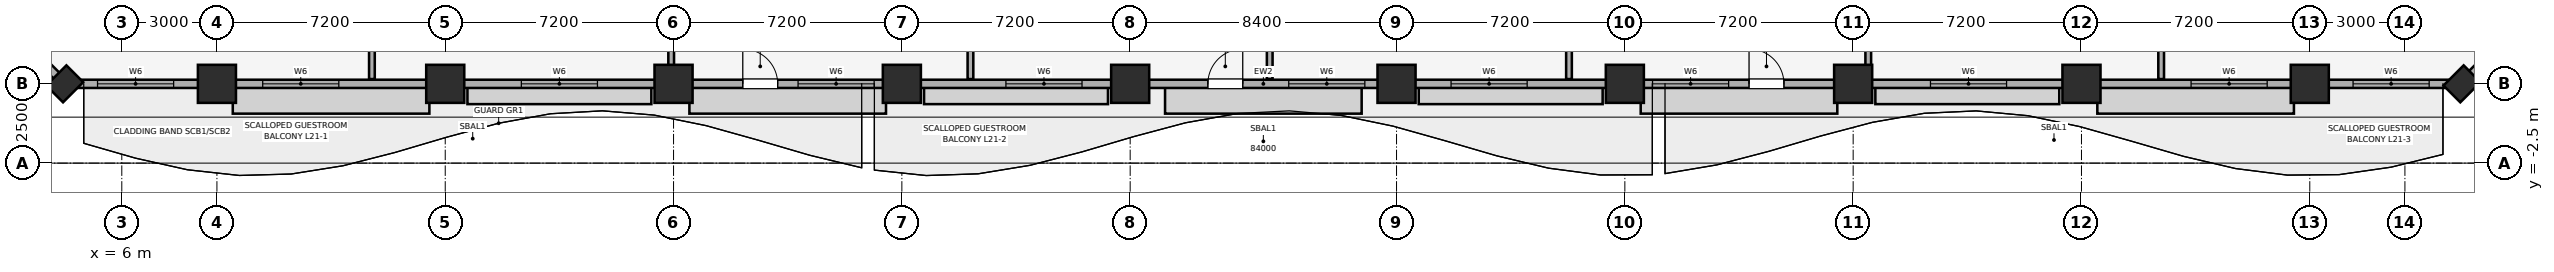
"""IFC4 building model, lengths in metres.
Left out: names, types, materials, properties, quantities, classifications, styles, units other than length and angle.
Written with IfcOpenShell. Run it as: python <this file> out.ifc"""

import sys

from ifc_helpers import new_model, si_unit, direction, frame, frame_2d, origin, origin_2d, place, context, subcontext, project, spatial, rectangle, extrude, element, fill, save


model = new_model("IFC4")
c1 = context("Model", 3, precision=1e-05, world=origin(), true_north=direction((0.0, 1.0)))
c2 = subcontext(c1, "Body", "Model", "MODEL_VIEW")
j1 = project(units=[si_unit("LENGTHUNIT", "METRE"), si_unit("PLANEANGLEUNIT", "RADIAN")], contexts=[c1])
p1 = place(None, origin())
s1 = spatial("IfcSite", under=j1, at=p1, CompositionType="ELEMENT")
p2 = place(p1, origin())
s2 = spatial("IfcBuilding", under=s1, at=p2, CompositionType="ELEMENT")
p3 = place(p2, frame((0.0, 0.0, 93.05)))
s3 = spatial("IfcBuildingStorey", under=s2, at=p3, CompositionType="ELEMENT", Elevation=93.05)
for number, where, z_axis, x_axis in (
    (1, (9.0, 0.0, 0.0), (0.0, 0.0, 1.0), (1.0, 0.0, 0.0)),
    (2, (16.2, 0.0, 0.0), (0.0, 0.0, 1.0), (1.0, 0.0, 0.0)),
    (3, (23.4, 0.0, 0.0), (0.0, 0.0, 1.0), (1.0, 0.0, 0.0)),
    (4, (30.6, 0.0, 0.0), (0.0, 0.0, 1.0), (1.0, 0.0, 0.0)),
    (5, (37.8, 0.0, 0.0), (0.0, 0.0, 1.0), (1.0, 0.0, 0.0)),
    (6, (46.2, 0.0, 0.0), (0.0, 0.0, 1.0), (1.0, 0.0, 0.0)),
    (7, (53.4, 0.0, 0.0), (0.0, 0.0, 1.0), (1.0, 0.0, 0.0)),
    (8, (60.6, 0.0, 0.0), (0.0, 0.0, 1.0), (1.0, 0.0, 0.0)),
    (9, (67.8, 0.0, 0.0), (0.0, 0.0, 1.0), (1.0, 0.0, 0.0)),
    (10, (75.0, 0.0, 0.0), (0.0, 0.0, 1.0), (1.0, 0.0, 0.0)),
):
    element("IfcColumn", number, at=place(p3, frame(where, z_axis=z_axis, x_axis=x_axis)), inside=s3, PredefinedType="COLUMN", context=c2, shape_type="SweptSolid", body=[
        extrude(rectangle(XDim=1.2, YDim=1.2, at=origin_2d()), origin(), (0.0, 0.0, 1.0), 3.51),
    ])
for number, where, z_axis, x_axis in (
    (11, (4.2, 0.0, 0.0), (0.0, 0.0, 1.0), (0.707, 0.707, 0.0)),
    (12, (79.8, 0.0, 0.0), (0.0, 0.0, 1.0), (0.707, 0.707, 0.0)),
):
    element("IfcColumn", number, at=place(p3, frame(where, z_axis=z_axis, x_axis=x_axis)), inside=s3, PredefinedType="PILASTER", context=c2, shape_type="SweptSolid", body=[
        extrude(rectangle(XDim=0.9, YDim=0.75, at=origin_2d()), origin(), (0.0, 0.0, 1.0), 3.51),
    ])
p4 = place(p3, frame((4.2, 0.0, 0.0), z_axis=(0.0, 0.0, 1.0), x_axis=(1.0, 0.0, 0.0)))
e13 = element("IfcWall", 13, at=p4, inside=s3, PredefinedType="SOLIDWALL", context=c2, shape_type="SweptSolid", body=[
    extrude(rectangle(XDim=75.6, YDim=0.26, at=frame_2d((37.8, 0.0))), origin(), (0.0, 0.0, 1.0), 2.56),
])
p5 = place(p4, frame((21.383, 0.0, 0.0)))
e14 = element("IfcOpeningElement", 14, at=p5, cuts=e13, PredefinedType="OPENING", context=c2, shape_type="SweptSolid", body=[
    extrude(rectangle(XDim=1.1, YDim=2.15, at=frame_2d((0.55, 1.075))), frame((0.0, 0.14, 0.0), z_axis=(0.0, -1.0, 0.0), x_axis=(1.0, 0.0, 0.0)), (0.0, 0.0, 1.0), 0.28),
])
p6 = place(p4, frame((36.05, 0.0, 0.0)))
e15 = element("IfcOpeningElement", 15, at=p6, cuts=e13, PredefinedType="OPENING", context=c2, shape_type="SweptSolid", body=[
    extrude(rectangle(XDim=1.1, YDim=2.15, at=frame_2d((0.55, 1.075))), frame((0.0, 0.14, 0.0), z_axis=(0.0, -1.0, 0.0), x_axis=(1.0, 0.0, 0.0)), (0.0, 0.0, 1.0), 0.28),
])
p7 = place(p4, frame((53.117, 0.0, 0.0)))
e16 = element("IfcOpeningElement", 16, at=p7, cuts=e13, PredefinedType="OPENING", context=c2, shape_type="SweptSolid", body=[
    extrude(rectangle(XDim=1.1, YDim=2.15, at=frame_2d((0.55, 1.075))), frame((0.0, 0.14, 0.0), z_axis=(0.0, -1.0, 0.0), x_axis=(1.0, 0.0, 0.0)), (0.0, 0.0, 1.0), 0.28),
])
p8 = place(p4, frame((1.035, 0.0, 0.85)))
e17 = element("IfcOpeningElement", 17, at=p8, cuts=e13, PredefinedType="OPENING", context=c2, shape_type="SweptSolid", body=[
    extrude(rectangle(XDim=2.4, YDim=1.5, at=frame_2d((1.2, 0.75))), frame((0.0, 0.14, 0.0), z_axis=(0.0, -1.0, 0.0), x_axis=(1.0, 0.0, 0.0)), (0.0, 0.0, 1.0), 0.28),
])
p9 = place(p4, frame((6.244, 0.0, 0.85)))
e18 = element("IfcOpeningElement", 18, at=p9, cuts=e13, PredefinedType="OPENING", context=c2, shape_type="SweptSolid", body=[
    extrude(rectangle(XDim=2.4, YDim=1.5, at=frame_2d((1.2, 0.75))), frame((0.0, 0.14, 0.0), z_axis=(0.0, -1.0, 0.0), x_axis=(1.0, 0.0, 0.0)), (0.0, 0.0, 1.0), 0.28),
])
p10 = place(p4, frame((14.4, 0.0, 0.85)))
e19 = element("IfcOpeningElement", 19, at=p10, cuts=e13, PredefinedType="OPENING", context=c2, shape_type="SweptSolid", body=[
    extrude(rectangle(XDim=2.4, YDim=1.5, at=frame_2d((1.2, 0.75))), frame((0.0, 0.14, 0.0), z_axis=(0.0, -1.0, 0.0), x_axis=(1.0, 0.0, 0.0)), (0.0, 0.0, 1.0), 0.28),
])
p11 = place(p4, frame((23.127, 0.0, 0.85)))
e20 = element("IfcOpeningElement", 20, at=p11, cuts=e13, PredefinedType="OPENING", context=c2, shape_type="SweptSolid", body=[
    extrude(rectangle(XDim=2.4, YDim=1.5, at=frame_2d((1.2, 0.75))), frame((0.0, 0.14, 0.0), z_axis=(0.0, -1.0, 0.0), x_axis=(1.0, 0.0, 0.0)), (0.0, 0.0, 1.0), 0.28),
])
p12 = place(p4, frame((29.681, 0.0, 0.85)))
e21 = element("IfcOpeningElement", 21, at=p12, cuts=e13, PredefinedType="OPENING", context=c2, shape_type="SweptSolid", body=[
    extrude(rectangle(XDim=2.4, YDim=1.5, at=frame_2d((1.2, 0.75))), frame((0.0, 0.14, 0.0), z_axis=(0.0, -1.0, 0.0), x_axis=(1.0, 0.0, 0.0)), (0.0, 0.0, 1.0), 0.28),
])
p13 = place(p4, frame((38.601, 0.0, 0.85)))
e22 = element("IfcOpeningElement", 22, at=p13, cuts=e13, PredefinedType="OPENING", context=c2, shape_type="SweptSolid", body=[
    extrude(rectangle(XDim=2.4, YDim=1.5, at=frame_2d((1.2, 0.75))), frame((0.0, 0.14, 0.0), z_axis=(0.0, -1.0, 0.0), x_axis=(1.0, 0.0, 0.0)), (0.0, 0.0, 1.0), 0.28),
])
p14 = place(p4, frame((43.719, 0.0, 0.85)))
e23 = element("IfcOpeningElement", 23, at=p14, cuts=e13, PredefinedType="OPENING", context=c2, shape_type="SweptSolid", body=[
    extrude(rectangle(XDim=2.4, YDim=1.5, at=frame_2d((1.2, 0.75))), frame((0.0, 0.14, 0.0), z_axis=(0.0, -1.0, 0.0), x_axis=(1.0, 0.0, 0.0)), (0.0, 0.0, 1.0), 0.28),
])
p15 = place(p4, frame((50.073, 0.0, 0.85)))
e24 = element("IfcOpeningElement", 24, at=p15, cuts=e13, PredefinedType="OPENING", context=c2, shape_type="SweptSolid", body=[
    extrude(rectangle(XDim=2.4, YDim=1.5, at=frame_2d((1.2, 0.75))), frame((0.0, 0.14, 0.0), z_axis=(0.0, -1.0, 0.0), x_axis=(1.0, 0.0, 0.0)), (0.0, 0.0, 1.0), 0.28),
])
p16 = place(p4, frame((58.838, 0.0, 0.85)))
e25 = element("IfcOpeningElement", 25, at=p16, cuts=e13, PredefinedType="OPENING", context=c2, shape_type="SweptSolid", body=[
    extrude(rectangle(XDim=2.4, YDim=1.5, at=frame_2d((1.2, 0.75))), frame((0.0, 0.14, 0.0), z_axis=(0.0, -1.0, 0.0), x_axis=(1.0, 0.0, 0.0)), (0.0, 0.0, 1.0), 0.28),
])
p17 = place(p4, frame((67.056, 0.0, 0.85)))
e26 = element("IfcOpeningElement", 26, at=p17, cuts=e13, PredefinedType="OPENING", context=c2, shape_type="SweptSolid", body=[
    extrude(rectangle(XDim=2.4, YDim=1.5, at=frame_2d((1.2, 0.75))), frame((0.0, 0.14, 0.0), z_axis=(0.0, -1.0, 0.0), x_axis=(1.0, 0.0, 0.0)), (0.0, 0.0, 1.0), 0.28),
])
p18 = place(p4, frame((72.165, 0.0, 0.85)))
e27 = element("IfcOpeningElement", 27, at=p18, cuts=e13, PredefinedType="OPENING", context=c2, shape_type="SweptSolid", body=[
    extrude(rectangle(XDim=2.4, YDim=1.5, at=frame_2d((1.2, 0.75))), frame((0.0, 0.14, 0.0), z_axis=(0.0, -1.0, 0.0), x_axis=(1.0, 0.0, 0.0)), (0.0, 0.0, 1.0), 0.28),
])
for number, where, z_axis, x_axis in (
    (28, (79.8, 0.0, 0.0), (0.0, 0.0, 1.0), (0.707, 0.707, 0.0)),
    (29, (0.0, 4.2, 0.0), (0.0, 0.0, 1.0), (0.707, -0.707, 0.0)),
):
    element("IfcWall", number, at=place(p3, frame(where, z_axis=z_axis, x_axis=x_axis)), inside=s3, PredefinedType="SOLIDWALL", context=c2, shape_type="SweptSolid", body=[
        extrude(rectangle(XDim=5.94, YDim=0.26, at=frame_2d((2.97, 0.0))), origin(), (0.0, 0.0, 1.0), 2.56),
    ])
p19 = place(p3, frame((13.888, 0.15, 0.0), z_axis=(0.0, 0.0, 1.0), x_axis=(0.0, 1.0, 0.0)))
e30 = element("IfcWall", 30, at=p19, inside=s3, PredefinedType="PARTITIONING", context=c2, shape_type="SweptSolid", body=[
    extrude(rectangle(XDim=20.355, YDim=0.18, at=frame_2d((10.177, 0.0))), origin(), (0.0, 0.0, 1.0), 3.51),
])
p20 = place(p3, frame((23.325, 0.15, 0.0), z_axis=(0.0, 0.0, 1.0), x_axis=(0.0, 1.0, 0.0)))
e31 = element("IfcWall", 31, at=p20, inside=s3, PredefinedType="PARTITIONING", context=c2, shape_type="SweptSolid", body=[
    extrude(rectangle(XDim=20.355, YDim=0.18, at=frame_2d((10.177, 0.0))), origin(), (0.0, 0.0, 1.0), 2.898),
])
p21 = place(p3, frame((32.763, 0.15, 0.0), z_axis=(0.0, 0.0, 1.0), x_axis=(0.0, 1.0, 0.0)))
e32 = element("IfcWall", 32, at=p21, inside=s3, PredefinedType="PARTITIONING", context=c2, shape_type="SweptSolid", body=[
    extrude(rectangle(XDim=20.355, YDim=0.18, at=frame_2d((10.177, 0.0))), origin(), (0.0, 0.0, 1.0), 3.51),
])
p22 = place(p3, frame((42.201, 0.15, 0.0), z_axis=(0.0, 0.0, 1.0), x_axis=(0.0, 1.0, 0.0)))
e33 = element("IfcWall", 33, at=p22, inside=s3, PredefinedType="PARTITIONING", context=c2, shape_type="SweptSolid", body=[
    extrude(rectangle(XDim=20.355, YDim=0.18, at=frame_2d((10.177, 0.0))), origin(), (0.0, 0.0, 1.0), 2.898),
])
for number, where, z_axis, x_axis in (
    (34, (51.638, 0.15, 0.0), (0.0, 0.0, 1.0), (0.0, 1.0, 0.0)),
    (35, (61.076, 0.15, 0.0), (0.0, 0.0, 1.0), (0.0, 1.0, 0.0)),
    (36, (70.313, 0.15, 0.0), (0.0, 0.0, 1.0), (0.0, 1.0, 0.0)),
):
    element("IfcWall", number, at=place(p3, frame(where, z_axis=z_axis, x_axis=x_axis)), inside=s3, PredefinedType="PARTITIONING", context=c2, shape_type="SweptSolid", body=[
        extrude(rectangle(XDim=20.355, YDim=0.18, at=frame_2d((10.177, 0.0))), origin(), (0.0, 0.0, 1.0), 3.51),
    ])
p23 = place(p5, origin())
e37 = element("IfcDoor", 37, at=p23, inside=s3, OperationType="SINGLE_SWING_LEFT", PredefinedType="DOOR", context=c2, shape_type="SweptSolid", body=[
    extrude(rectangle(XDim=1.1, YDim=2.15, at=frame_2d((0.55, 1.075))), frame((0.0, 0.025, 0.0), z_axis=(0.0, -1.0, 0.0), x_axis=(1.0, 0.0, 0.0)), (0.0, 0.0, 1.0), 0.05),
])
fill(e14, e37)
p24 = place(p6, origin())
e38 = element("IfcDoor", 38, at=p24, inside=s3, OperationType="SINGLE_SWING_RIGHT", PredefinedType="DOOR", context=c2, shape_type="SweptSolid", body=[
    extrude(rectangle(XDim=1.1, YDim=2.15, at=frame_2d((0.55, 1.075))), frame((0.0, 0.025, 0.0), z_axis=(0.0, -1.0, 0.0), x_axis=(1.0, 0.0, 0.0)), (0.0, 0.0, 1.0), 0.05),
])
fill(e15, e38)
p25 = place(p7, origin())
e39 = element("IfcDoor", 39, at=p25, inside=s3, OperationType="SINGLE_SWING_LEFT", PredefinedType="DOOR", context=c2, shape_type="SweptSolid", body=[
    extrude(rectangle(XDim=1.1, YDim=2.15, at=frame_2d((0.55, 1.075))), frame((0.0, 0.025, 0.0), z_axis=(0.0, -1.0, 0.0), x_axis=(1.0, 0.0, 0.0)), (0.0, 0.0, 1.0), 0.05),
])
fill(e16, e39)
p26 = place(p8, origin())
e40 = element("IfcWindow", 40, at=p26, inside=s3, PartitioningType="SINGLE_PANEL", PredefinedType="WINDOW", context=c2, shape_type="SweptSolid", body=[
    extrude(rectangle(XDim=2.4, YDim=1.5, at=frame_2d((1.2, 0.75))), frame((0.0, 0.03, 0.0), z_axis=(0.0, -1.0, 0.0), x_axis=(1.0, 0.0, 0.0)), (0.0, 0.0, 1.0), 0.06),
])
fill(e17, e40)
p27 = place(p9, origin())
e41 = element("IfcWindow", 41, at=p27, inside=s3, PartitioningType="SINGLE_PANEL", PredefinedType="WINDOW", context=c2, shape_type="SweptSolid", body=[
    extrude(rectangle(XDim=2.4, YDim=1.5, at=frame_2d((1.2, 0.75))), frame((0.0, 0.03, 0.0), z_axis=(0.0, -1.0, 0.0), x_axis=(1.0, 0.0, 0.0)), (0.0, 0.0, 1.0), 0.06),
])
fill(e18, e41)
p28 = place(p10, origin())
e42 = element("IfcWindow", 42, at=p28, inside=s3, PartitioningType="SINGLE_PANEL", PredefinedType="WINDOW", context=c2, shape_type="SweptSolid", body=[
    extrude(rectangle(XDim=2.4, YDim=1.5, at=frame_2d((1.2, 0.75))), frame((0.0, 0.03, 0.0), z_axis=(0.0, -1.0, 0.0), x_axis=(1.0, 0.0, 0.0)), (0.0, 0.0, 1.0), 0.06),
])
fill(e19, e42)
p29 = place(p11, origin())
e43 = element("IfcWindow", 43, at=p29, inside=s3, PartitioningType="SINGLE_PANEL", PredefinedType="WINDOW", context=c2, shape_type="SweptSolid", body=[
    extrude(rectangle(XDim=2.4, YDim=1.5, at=frame_2d((1.2, 0.75))), frame((0.0, 0.03, 0.0), z_axis=(0.0, -1.0, 0.0), x_axis=(1.0, 0.0, 0.0)), (0.0, 0.0, 1.0), 0.06),
])
fill(e20, e43)
p30 = place(p12, origin())
e44 = element("IfcWindow", 44, at=p30, inside=s3, PartitioningType="SINGLE_PANEL", PredefinedType="WINDOW", context=c2, shape_type="SweptSolid", body=[
    extrude(rectangle(XDim=2.4, YDim=1.5, at=frame_2d((1.2, 0.75))), frame((0.0, 0.03, 0.0), z_axis=(0.0, -1.0, 0.0), x_axis=(1.0, 0.0, 0.0)), (0.0, 0.0, 1.0), 0.06),
])
fill(e21, e44)
p31 = place(p13, origin())
e45 = element("IfcWindow", 45, at=p31, inside=s3, PartitioningType="SINGLE_PANEL", PredefinedType="WINDOW", context=c2, shape_type="SweptSolid", body=[
    extrude(rectangle(XDim=2.4, YDim=1.5, at=frame_2d((1.2, 0.75))), frame((0.0, 0.03, 0.0), z_axis=(0.0, -1.0, 0.0), x_axis=(1.0, 0.0, 0.0)), (0.0, 0.0, 1.0), 0.06),
])
fill(e22, e45)
p32 = place(p14, origin())
e46 = element("IfcWindow", 46, at=p32, inside=s3, PartitioningType="SINGLE_PANEL", PredefinedType="WINDOW", context=c2, shape_type="SweptSolid", body=[
    extrude(rectangle(XDim=2.4, YDim=1.5, at=frame_2d((1.2, 0.75))), frame((0.0, 0.03, 0.0), z_axis=(0.0, -1.0, 0.0), x_axis=(1.0, 0.0, 0.0)), (0.0, 0.0, 1.0), 0.06),
])
fill(e23, e46)
p33 = place(p15, origin())
e47 = element("IfcWindow", 47, at=p33, inside=s3, PartitioningType="SINGLE_PANEL", PredefinedType="WINDOW", context=c2, shape_type="SweptSolid", body=[
    extrude(rectangle(XDim=2.4, YDim=1.5, at=frame_2d((1.2, 0.75))), frame((0.0, 0.03, 0.0), z_axis=(0.0, -1.0, 0.0), x_axis=(1.0, 0.0, 0.0)), (0.0, 0.0, 1.0), 0.06),
])
fill(e24, e47)
p34 = place(p16, origin())
e48 = element("IfcWindow", 48, at=p34, inside=s3, PartitioningType="SINGLE_PANEL", PredefinedType="WINDOW", context=c2, shape_type="SweptSolid", body=[
    extrude(rectangle(XDim=2.4, YDim=1.5, at=frame_2d((1.2, 0.75))), frame((0.0, 0.03, 0.0), z_axis=(0.0, -1.0, 0.0), x_axis=(1.0, 0.0, 0.0)), (0.0, 0.0, 1.0), 0.06),
])
fill(e25, e48)
p35 = place(p17, origin())
e49 = element("IfcWindow", 49, at=p35, inside=s3, PartitioningType="SINGLE_PANEL", PredefinedType="WINDOW", context=c2, shape_type="SweptSolid", body=[
    extrude(rectangle(XDim=2.4, YDim=1.5, at=frame_2d((1.2, 0.75))), frame((0.0, 0.03, 0.0), z_axis=(0.0, -1.0, 0.0), x_axis=(1.0, 0.0, 0.0)), (0.0, 0.0, 1.0), 0.06),
])
fill(e26, e49)
p36 = place(p18, origin())
e50 = element("IfcWindow", 50, at=p36, inside=s3, PartitioningType="SINGLE_PANEL", PredefinedType="WINDOW", context=c2, shape_type="SweptSolid", body=[
    extrude(rectangle(XDim=2.4, YDim=1.5, at=frame_2d((1.2, 0.75))), frame((0.0, 0.03, 0.0), z_axis=(0.0, -1.0, 0.0), x_axis=(1.0, 0.0, 0.0)), (0.0, 0.0, 1.0), 0.06),
])
fill(e27, e50)
save(model, sys.argv[1])
